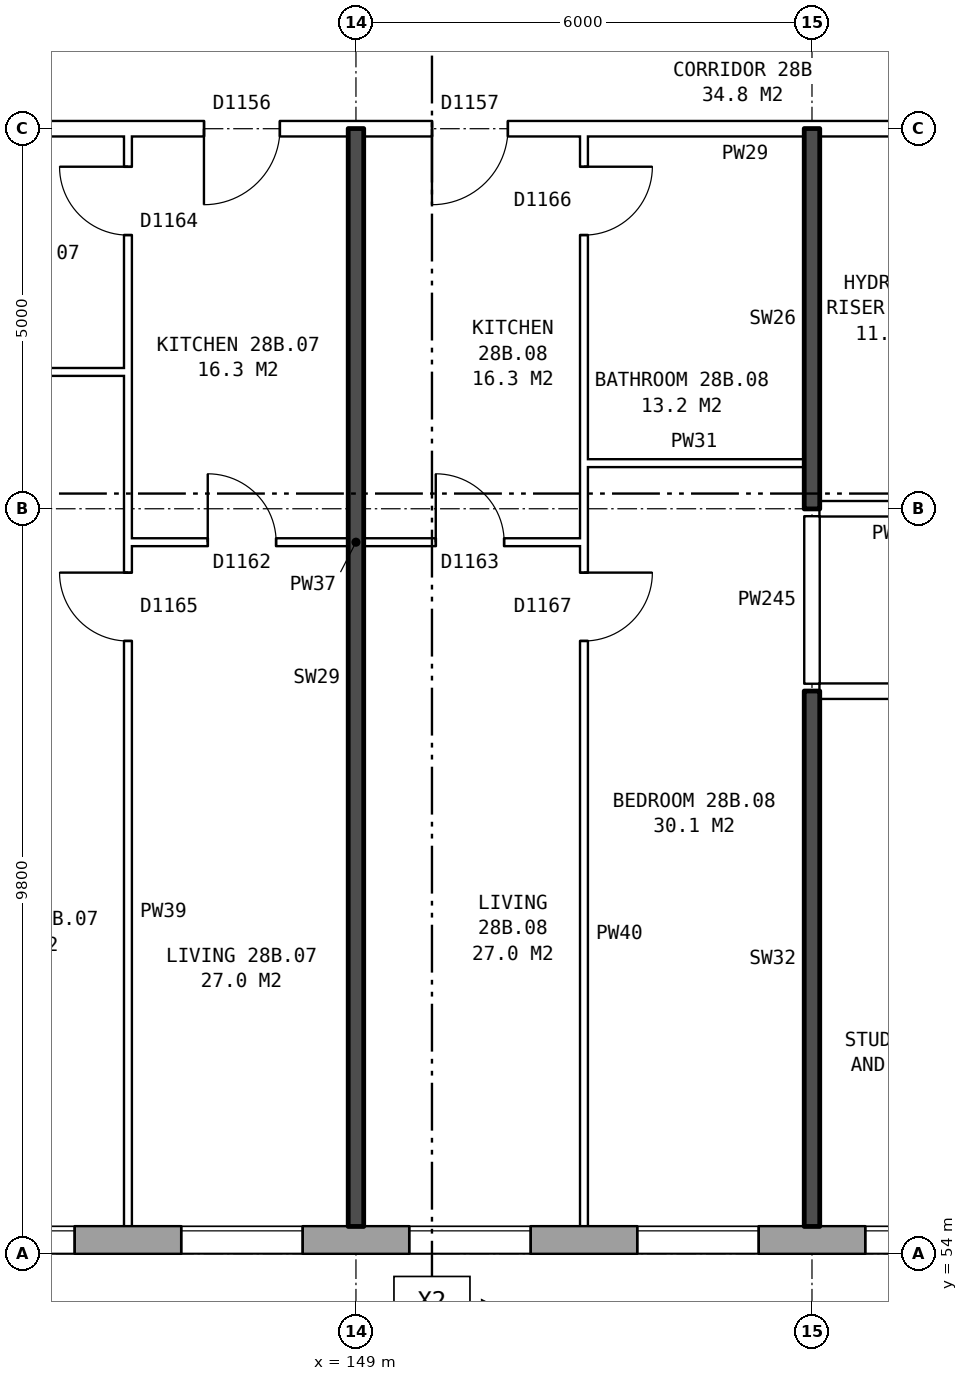
"""IFC4 building model, lengths in metres.
Left out: names, types, materials, properties, quantities, classifications, styles, units other than length and angle.
Written with IfcOpenShell. Run it as: python <this file> out.ifc"""

import sys

from ifc_helpers import new_model, si_unit, direction, frame, frame_2d, origin, place, context, subcontext, project, spatial, rectangle, extrude, element, fill, save


model = new_model("IFC4")
c1 = context("Model", 3, precision=1e-05, world=origin(), true_north=direction((0.0, 1.0)))
c2 = subcontext(c1, "Body", "Model", "MODEL_VIEW")
j1 = project(units=[si_unit("LENGTHUNIT", "METRE"), si_unit("PLANEANGLEUNIT", "RADIAN")], contexts=[c1])
p1 = place(None, origin())
s1 = spatial("IfcSite", under=j1, at=p1, CompositionType="ELEMENT")
p2 = place(p1, origin())
s2 = spatial("IfcBuilding", under=s1, at=p2, CompositionType="ELEMENT")
p3 = place(p2, frame((0.0, 0.0, 102.6)))
s3 = spatial("IfcBuildingStorey", under=s2, at=p3, CompositionType="ELEMENT", Elevation=102.6)
p4 = place(p3, frame((134.075, 54.18, 0.0), z_axis=(0.0, 0.0, 1.0), x_axis=(1.0, 0.0, 0.0)))
e1 = element("IfcWall", 1, at=p4, inside=s3, PredefinedType="STANDARD", context=c2, shape_type="SweptSolid", body=[
    extrude(rectangle(XDim=36.851, YDim=0.36, at=frame_2d((18.425, 0.0))), origin(), (0.0, 0.0, 1.0), 2.85),
])
p5 = place(p4, frame((0.625, 0.0, 0.8)))
e2 = element("IfcOpeningElement", 2, at=p5, cuts=e1, PredefinedType="OPENING", context=c2, shape_type="SweptSolid", body=[
    extrude(rectangle(XDim=1.6, YDim=1.8, at=frame_2d((0.8, 0.9))), frame((0.0, 0.19, 0.0), z_axis=(0.0, -1.0, 0.0), x_axis=(1.0, 0.0, 0.0)), (0.0, 0.0, 1.0), 0.38),
])
p6 = place(p4, frame((3.625, 0.0, 0.8)))
e3 = element("IfcOpeningElement", 3, at=p6, cuts=e1, PredefinedType="OPENING", context=c2, shape_type="SweptSolid", body=[
    extrude(rectangle(XDim=1.6, YDim=1.8, at=frame_2d((0.8, 0.9))), frame((0.0, 0.19, 0.0), z_axis=(0.0, -1.0, 0.0), x_axis=(1.0, 0.0, 0.0)), (0.0, 0.0, 1.0), 0.38),
])
p7 = place(p4, frame((7.475, 0.0, 0.8)))
e4 = element("IfcOpeningElement", 4, at=p7, cuts=e1, PredefinedType="OPENING", context=c2, shape_type="SweptSolid", body=[
    extrude(rectangle(XDim=1.2, YDim=1.2, at=frame_2d((0.6, 0.6))), frame((0.0, 0.19, 0.0), z_axis=(0.0, -1.0, 0.0), x_axis=(1.0, 0.0, 0.0)), (0.0, 0.0, 1.0), 0.38),
])
p8 = place(p4, frame((9.625, 0.0, 0.8)))
e5 = element("IfcOpeningElement", 5, at=p8, cuts=e1, PredefinedType="OPENING", context=c2, shape_type="SweptSolid", body=[
    extrude(rectangle(XDim=1.6, YDim=1.8, at=frame_2d((0.8, 0.9))), frame((0.0, 0.19, 0.0), z_axis=(0.0, -1.0, 0.0), x_axis=(1.0, 0.0, 0.0)), (0.0, 0.0, 1.0), 0.38),
])
p9 = place(p4, frame((12.625, 0.0, 0.8)))
e6 = element("IfcOpeningElement", 6, at=p9, cuts=e1, PredefinedType="OPENING", context=c2, shape_type="SweptSolid", body=[
    extrude(rectangle(XDim=1.6, YDim=1.8, at=frame_2d((0.8, 0.9))), frame((0.0, 0.19, 0.0), z_axis=(0.0, -1.0, 0.0), x_axis=(1.0, 0.0, 0.0)), (0.0, 0.0, 1.0), 0.38),
])
p10 = place(p4, frame((15.625, 0.0, 0.8)))
e7 = element("IfcOpeningElement", 7, at=p10, cuts=e1, PredefinedType="OPENING", context=c2, shape_type="SweptSolid", body=[
    extrude(rectangle(XDim=1.6, YDim=1.8, at=frame_2d((0.8, 0.9))), frame((0.0, 0.19, 0.0), z_axis=(0.0, -1.0, 0.0), x_axis=(1.0, 0.0, 0.0)), (0.0, 0.0, 1.0), 0.38),
])
p11 = place(p4, frame((18.625, 0.0, 0.8)))
e8 = element("IfcOpeningElement", 8, at=p11, cuts=e1, PredefinedType="OPENING", context=c2, shape_type="SweptSolid", body=[
    extrude(rectangle(XDim=1.6, YDim=1.8, at=frame_2d((0.8, 0.9))), frame((0.0, 0.19, 0.0), z_axis=(0.0, -1.0, 0.0), x_axis=(1.0, 0.0, 0.0)), (0.0, 0.0, 1.0), 0.38),
])
p12 = place(p4, frame((21.625, 0.0, 0.8)))
e9 = element("IfcOpeningElement", 9, at=p12, cuts=e1, PredefinedType="OPENING", context=c2, shape_type="SweptSolid", body=[
    extrude(rectangle(XDim=1.6, YDim=1.8, at=frame_2d((0.8, 0.9))), frame((0.0, 0.19, 0.0), z_axis=(0.0, -1.0, 0.0), x_axis=(1.0, 0.0, 0.0)), (0.0, 0.0, 1.0), 0.38),
])
p13 = place(p4, frame((24.625, 0.0, 0.8)))
e10 = element("IfcOpeningElement", 10, at=p13, cuts=e1, PredefinedType="OPENING", context=c2, shape_type="SweptSolid", body=[
    extrude(rectangle(XDim=1.6, YDim=1.8, at=frame_2d((0.8, 0.9))), frame((0.0, 0.19, 0.0), z_axis=(0.0, -1.0, 0.0), x_axis=(1.0, 0.0, 0.0)), (0.0, 0.0, 1.0), 0.38),
])
p14 = place(p4, frame((27.125, 0.0, 0.8)))
e11 = element("IfcOpeningElement", 11, at=p14, cuts=e1, PredefinedType="OPENING", context=c2, shape_type="SweptSolid", body=[
    extrude(rectangle(XDim=1.4, YDim=1.8, at=frame_2d((0.7, 0.9))), frame((0.0, 0.19, 0.0), z_axis=(0.0, -1.0, 0.0), x_axis=(1.0, 0.0, 0.0)), (0.0, 0.0, 1.0), 0.38),
])
p15 = place(p4, frame((28.825, 0.0, 0.8)))
e12 = element("IfcOpeningElement", 12, at=p15, cuts=e1, PredefinedType="OPENING", context=c2, shape_type="SweptSolid", body=[
    extrude(rectangle(XDim=0.8, YDim=0.9, at=frame_2d((0.4, 0.45))), frame((0.0, 0.19, 0.0), z_axis=(0.0, -1.0, 0.0), x_axis=(1.0, 0.0, 0.0)), (0.0, 0.0, 1.0), 0.38),
])
p16 = place(p4, frame((33.625, 0.0, 0.8)))
e13 = element("IfcOpeningElement", 13, at=p16, cuts=e1, PredefinedType="OPENING", context=c2, shape_type="SweptSolid", body=[
    extrude(rectangle(XDim=1.6, YDim=1.8, at=frame_2d((0.8, 0.9))), frame((0.0, 0.19, 0.0), z_axis=(0.0, -1.0, 0.0), x_axis=(1.0, 0.0, 0.0)), (0.0, 0.0, 1.0), 0.38),
])
p17 = place(p4, frame((30.825, 0.0, 1.7)))
e14 = element("IfcOpeningElement", 14, at=p17, cuts=e1, PredefinedType="OPENING", context=c2, shape_type="SweptSolid", body=[
    extrude(rectangle(XDim=0.8, YDim=0.9, at=frame_2d((0.4, 0.45))), frame((0.0, 0.19, 0.0), z_axis=(0.0, -1.0, 0.0), x_axis=(1.0, 0.0, 0.0)), (0.0, 0.0, 1.0), 0.38),
])
p18 = place(p4, frame((31.925, 0.0, 0.8)))
e15 = element("IfcOpeningElement", 15, at=p18, cuts=e1, PredefinedType="OPENING", context=c2, shape_type="SweptSolid", body=[
    extrude(rectangle(XDim=0.8, YDim=1.8, at=frame_2d((0.4, 0.9))), frame((0.0, 0.19, 0.0), z_axis=(0.0, -1.0, 0.0), x_axis=(1.0, 0.0, 0.0)), (0.0, 0.0, 1.0), 0.38),
])
p19 = place(p3, frame((155.1, 61.4, 0.0), z_axis=(0.0, 0.0, 1.0), x_axis=(1.0, 0.0, 0.0)))
e16 = element("IfcWall", 16, at=p19, inside=s3, PredefinedType="PARTITIONING", context=c2, shape_type="SweptSolid", body=[
    extrude(rectangle(XDim=18.54, YDim=0.2, at=frame_2d((9.27, 0.0))), origin(), (0.0, 0.0, 1.0), 2.85),
])
p20 = place(p19, frame((1.45, 0.0, 0.0)))
e17 = element("IfcOpeningElement", 17, at=p20, cuts=e16, PredefinedType="OPENING", context=c2, shape_type="SweptSolid", body=[
    extrude(rectangle(XDim=1.0, YDim=2.1, at=frame_2d((0.5, 1.05))), frame((0.0, 0.11, 0.0), z_axis=(0.0, -1.0, 0.0), x_axis=(1.0, 0.0, 0.0)), (0.0, 0.0, 1.0), 0.22),
])
p21 = place(p19, frame((9.6, 0.0, 0.0)))
e18 = element("IfcOpeningElement", 18, at=p21, cuts=e16, PredefinedType="OPENING", context=c2, shape_type="SweptSolid", body=[
    extrude(rectangle(XDim=1.0, YDim=2.1, at=frame_2d((0.5, 1.05))), frame((0.0, 0.11, 0.0), z_axis=(0.0, -1.0, 0.0), x_axis=(1.0, 0.0, 0.0)), (0.0, 0.0, 1.0), 0.22),
])
p22 = place(p19, frame((15.92, 0.0, 0.0)))
e19 = element("IfcOpeningElement", 19, at=p22, cuts=e16, PredefinedType="OPENING", context=c2, shape_type="SweptSolid", body=[
    extrude(rectangle(XDim=1.0, YDim=2.1, at=frame_2d((0.5, 1.05))), frame((0.0, 0.11, 0.0), z_axis=(0.0, -1.0, 0.0), x_axis=(1.0, 0.0, 0.0)), (0.0, 0.0, 1.0), 0.22),
])
p23 = place(p3, frame((146.0, 63.36, 0.0), z_axis=(0.0, 0.0, 1.0), x_axis=(1.0, 0.0, 0.0)))
e20 = element("IfcWall", 20, at=p23, inside=s3, PredefinedType="PARTITIONING", context=c2, shape_type="SweptSolid", body=[
    extrude(rectangle(XDim=6.0, YDim=0.1, at=frame_2d((3.0, 0.0))), origin(), (0.0, 0.0, 1.0), 2.85),
])
p24 = place(p23, frame((1.05, 0.0, 0.0)))
e21 = element("IfcOpeningElement", 21, at=p24, cuts=e20, PredefinedType="OPENING", context=c2, shape_type="SweptSolid", body=[
    extrude(rectangle(XDim=0.9, YDim=2.1, at=frame_2d((0.45, 1.05))), frame((0.0, 0.06, 0.0), z_axis=(0.0, -1.0, 0.0), x_axis=(1.0, 0.0, 0.0)), (0.0, 0.0, 1.0), 0.12),
])
p25 = place(p23, frame((4.05, 0.0, 0.0)))
e22 = element("IfcOpeningElement", 22, at=p25, cuts=e20, PredefinedType="OPENING", context=c2, shape_type="SweptSolid", body=[
    extrude(rectangle(XDim=0.9, YDim=2.1, at=frame_2d((0.45, 1.05))), frame((0.0, 0.06, 0.0), z_axis=(0.0, -1.0, 0.0), x_axis=(1.0, 0.0, 0.0)), (0.0, 0.0, 1.0), 0.12),
])
p26 = place(p3, frame((155.1, 63.8, 0.0), z_axis=(0.0, 0.0, 1.0), x_axis=(1.0, 0.0, 0.0)))
e23 = element("IfcWall", 23, at=p26, inside=s3, PredefinedType="PARTITIONING", context=c2, shape_type="SweptSolid", body=[
    extrude(rectangle(XDim=2.14, YDim=0.2, at=frame_2d((1.07, 0.0))), origin(), (0.0, 0.0, 1.0), 2.85),
])
p27 = place(p3, frame((152.0, 64.4, 0.0), z_axis=(0.0, 0.0, 1.0), x_axis=(1.0, 0.0, 0.0)))
e24 = element("IfcWall", 24, at=p27, inside=s3, PredefinedType="PARTITIONING", context=c2, shape_type="SweptSolid", body=[
    extrude(rectangle(XDim=2.9, YDim=0.1, at=frame_2d((1.45, 0.0))), origin(), (0.0, 0.0, 1.0), 2.85),
])
p28 = place(p3, frame((142.76, 65.6, 0.0), z_axis=(0.0, 0.0, 1.0), x_axis=(1.0, 0.0, 0.0)))
e25 = element("IfcWall", 25, at=p28, inside=s3, PredefinedType="PARTITIONING", context=c2, shape_type="SweptSolid", body=[
    extrude(rectangle(XDim=3.24, YDim=0.1, at=frame_2d((1.62, 0.0))), origin(), (0.0, 0.0, 1.0), 2.85),
])
p29 = place(p3, frame((142.76, 68.8, 0.0), z_axis=(0.0, 0.0, 1.0), x_axis=(1.0, 0.0, 0.0)))
e26 = element("IfcWall", 26, at=p29, inside=s3, PredefinedType="PARTITIONING", context=c2, shape_type="SweptSolid", body=[
    extrude(rectangle(XDim=14.48, YDim=0.2, at=frame_2d((7.24, 0.0))), origin(), (0.0, 0.0, 1.0), 2.85),
])
p30 = place(p29, frame((4.24, 0.0, 0.0)))
e27 = element("IfcOpeningElement", 27, at=p30, cuts=e26, PredefinedType="OPENING", context=c2, shape_type="SweptSolid", body=[
    extrude(rectangle(XDim=1.0, YDim=2.1, at=frame_2d((0.5, 1.05))), frame((0.0, 0.11, 0.0), z_axis=(0.0, -1.0, 0.0), x_axis=(1.0, 0.0, 0.0)), (0.0, 0.0, 1.0), 0.22),
])
p31 = place(p29, frame((7.24, 0.0, 0.0)))
e28 = element("IfcOpeningElement", 28, at=p31, cuts=e26, PredefinedType="OPENING", context=c2, shape_type="SweptSolid", body=[
    extrude(rectangle(XDim=1.0, YDim=2.1, at=frame_2d((0.5, 1.05))), frame((0.0, 0.11, 0.0), z_axis=(0.0, -1.0, 0.0), x_axis=(1.0, 0.0, 0.0)), (0.0, 0.0, 1.0), 0.22),
])
p32 = place(p3, frame((146.0, 54.36, 0.0), z_axis=(0.0, 0.0, 1.0), x_axis=(0.0, 1.0, 0.0)))
e29 = element("IfcWall", 29, at=p32, inside=s3, PredefinedType="PARTITIONING", context=c2, shape_type="SweptSolid", body=[
    extrude(rectangle(XDim=14.34, YDim=0.1, at=frame_2d((7.17, 0.0))), origin(), (0.0, 0.0, 1.0), 2.85),
])
p33 = place(p32, frame((7.7, 0.0, 0.0)))
e30 = element("IfcOpeningElement", 30, at=p33, cuts=e29, PredefinedType="OPENING", context=c2, shape_type="SweptSolid", body=[
    extrude(rectangle(XDim=0.9, YDim=2.1, at=frame_2d((0.45, 1.05))), frame((0.0, 0.06, 0.0), z_axis=(0.0, -1.0, 0.0), x_axis=(1.0, 0.0, 0.0)), (0.0, 0.0, 1.0), 0.12),
])
p34 = place(p32, frame((13.04, 0.0, 0.0)))
e31 = element("IfcOpeningElement", 31, at=p34, cuts=e29, PredefinedType="OPENING", context=c2, shape_type="SweptSolid", body=[
    extrude(rectangle(XDim=0.9, YDim=2.1, at=frame_2d((0.45, 1.05))), frame((0.0, 0.06, 0.0), z_axis=(0.0, -1.0, 0.0), x_axis=(1.0, 0.0, 0.0)), (0.0, 0.0, 1.0), 0.12),
])
p35 = place(p3, frame((149.0, 54.36, 0.0), z_axis=(0.0, 0.0, 1.0), x_axis=(0.0, 1.0, 0.0)))
e32 = element("IfcWall", 32, at=p35, inside=s3, PredefinedType="SOLIDWALL", context=c2, shape_type="SweptSolid", body=[
    extrude(rectangle(XDim=14.44, YDim=0.2, at=frame_2d((7.22, 0.0))), origin(), (0.0, 0.0, 1.0), 2.85),
])
p36 = place(p3, frame((152.0, 54.36, 0.0), z_axis=(0.0, 0.0, 1.0), x_axis=(0.0, 1.0, 0.0)))
e33 = element("IfcWall", 33, at=p36, inside=s3, PredefinedType="PARTITIONING", context=c2, shape_type="SweptSolid", body=[
    extrude(rectangle(XDim=14.34, YDim=0.1, at=frame_2d((7.17, 0.0))), origin(), (0.0, 0.0, 1.0), 2.85),
])
p37 = place(p36, frame((7.7, 0.0, 0.0)))
e34 = element("IfcOpeningElement", 34, at=p37, cuts=e33, PredefinedType="OPENING", context=c2, shape_type="SweptSolid", body=[
    extrude(rectangle(XDim=0.9, YDim=2.1, at=frame_2d((0.45, 1.05))), frame((0.0, 0.06, 0.0), z_axis=(0.0, -1.0, 0.0), x_axis=(1.0, 0.0, 0.0)), (0.0, 0.0, 1.0), 0.12),
])
p38 = place(p36, frame((13.04, 0.0, 0.0)))
e35 = element("IfcOpeningElement", 35, at=p38, cuts=e33, PredefinedType="OPENING", context=c2, shape_type="SweptSolid", body=[
    extrude(rectangle(XDim=0.9, YDim=2.1, at=frame_2d((0.45, 1.05))), frame((0.0, 0.06, 0.0), z_axis=(0.0, -1.0, 0.0), x_axis=(1.0, 0.0, 0.0)), (0.0, 0.0, 1.0), 0.12),
])
p39 = place(p3, frame((155.0, 54.36, 0.0), z_axis=(0.0, 0.0, 1.0), x_axis=(0.0, 1.0, 0.0)))
e36 = element("IfcWall", 36, at=p39, inside=s3, PredefinedType="SOLIDWALL", context=c2, shape_type="SweptSolid", body=[
    extrude(rectangle(XDim=7.04, YDim=0.2, at=frame_2d((3.52, 0.0))), origin(), (0.0, 0.0, 1.0), 2.85),
])
p40 = place(p3, frame((155.0, 61.5, 0.0), z_axis=(0.0, 0.0, 1.0), x_axis=(0.0, 1.0, 0.0)))
e37 = element("IfcWall", 37, at=p40, inside=s3, PredefinedType="PARTITIONING", context=c2, shape_type="SweptSolid", body=[
    extrude(rectangle(XDim=2.2, YDim=0.2, at=frame_2d((1.1, 0.0))), origin(), (0.0, 0.0, 1.0), 2.85),
])
p41 = place(p3, frame((155.0, 63.8, 0.0), z_axis=(0.0, 0.0, 1.0), x_axis=(0.0, 1.0, 0.0)))
e38 = element("IfcWall", 38, at=p41, inside=s3, PredefinedType="SOLIDWALL", context=c2, shape_type="SweptSolid", body=[
    extrude(rectangle(XDim=5.0, YDim=0.2, at=frame_2d((2.5, 0.0))), origin(), (0.0, 0.0, 1.0), 2.85),
])
p42 = place(p8, origin())
e39 = element("IfcWindow", 39, at=p42, inside=s3, PartitioningType="SINGLE_PANEL", PredefinedType="WINDOW", context=c2, shape_type="SweptSolid", body=[
    extrude(rectangle(XDim=1.6, YDim=1.8, at=frame_2d((0.8, 0.9))), frame((0.0, 0.15, 0.0), z_axis=(0.0, -1.0, 0.0), x_axis=(1.0, 0.0, 0.0)), (0.0, 0.0, 1.0), 0.06),
])
fill(e5, e39)
p43 = place(p9, origin())
e40 = element("IfcWindow", 40, at=p43, inside=s3, PartitioningType="SINGLE_PANEL", PredefinedType="WINDOW", context=c2, shape_type="SweptSolid", body=[
    extrude(rectangle(XDim=1.6, YDim=1.8, at=frame_2d((0.8, 0.9))), frame((0.0, 0.15, 0.0), z_axis=(0.0, -1.0, 0.0), x_axis=(1.0, 0.0, 0.0)), (0.0, 0.0, 1.0), 0.06),
])
fill(e6, e40)
p44 = place(p10, origin())
e41 = element("IfcWindow", 41, at=p44, inside=s3, PartitioningType="SINGLE_PANEL", PredefinedType="WINDOW", context=c2, shape_type="SweptSolid", body=[
    extrude(rectangle(XDim=1.6, YDim=1.8, at=frame_2d((0.8, 0.9))), frame((0.0, 0.15, 0.0), z_axis=(0.0, -1.0, 0.0), x_axis=(1.0, 0.0, 0.0)), (0.0, 0.0, 1.0), 0.06),
])
fill(e7, e41)
p45 = place(p11, origin())
e42 = element("IfcWindow", 42, at=p45, inside=s3, PartitioningType="SINGLE_PANEL", PredefinedType="WINDOW", context=c2, shape_type="SweptSolid", body=[
    extrude(rectangle(XDim=1.6, YDim=1.8, at=frame_2d((0.8, 0.9))), frame((0.0, 0.15, 0.0), z_axis=(0.0, -1.0, 0.0), x_axis=(1.0, 0.0, 0.0)), (0.0, 0.0, 1.0), 0.06),
])
fill(e8, e42)
p46 = place(p12, origin())
e43 = element("IfcWindow", 43, at=p46, inside=s3, PartitioningType="SINGLE_PANEL", PredefinedType="WINDOW", context=c2, shape_type="SweptSolid", body=[
    extrude(rectangle(XDim=1.6, YDim=1.8, at=frame_2d((0.8, 0.9))), frame((0.0, 0.15, 0.0), z_axis=(0.0, -1.0, 0.0), x_axis=(1.0, 0.0, 0.0)), (0.0, 0.0, 1.0), 0.06),
])
fill(e9, e43)
p47 = place(p33, origin())
e44 = element("IfcDoor", 44, at=p47, inside=s3, OperationType="SINGLE_SWING_RIGHT", PredefinedType="DOOR", context=c2, shape_type="SweptSolid", body=[
    extrude(rectangle(XDim=0.9, YDim=2.1, at=frame_2d((0.45, 1.05))), frame((0.0, 0.025, 0.0), z_axis=(0.0, -1.0, 0.0), x_axis=(1.0, 0.0, 0.0)), (0.0, 0.0, 1.0), 0.05),
])
fill(e30, e44)
p48 = place(p30, frame((1.0, 0.0, 0.0), z_axis=(0.0, 0.0, 1.0), x_axis=(-1.0, 0.0, 0.0)))
e45 = element("IfcDoor", 45, at=p48, inside=s3, OperationType="SINGLE_SWING_RIGHT", PredefinedType="DOOR", context=c2, shape_type="SweptSolid", body=[
    extrude(rectangle(XDim=1.0, YDim=2.1, at=frame_2d((0.5, 1.05))), frame((0.0, 0.025, 0.0), z_axis=(0.0, -1.0, 0.0), x_axis=(1.0, 0.0, 0.0)), (0.0, 0.0, 1.0), 0.05),
])
fill(e27, e45)
p49 = place(p24, origin())
e46 = element("IfcDoor", 46, at=p49, inside=s3, OperationType="SINGLE_SWING_LEFT", PredefinedType="DOOR", context=c2, shape_type="SweptSolid", body=[
    extrude(rectangle(XDim=0.9, YDim=2.1, at=frame_2d((0.45, 1.05))), frame((0.0, 0.025, 0.0), z_axis=(0.0, -1.0, 0.0), x_axis=(1.0, 0.0, 0.0)), (0.0, 0.0, 1.0), 0.05),
])
fill(e21, e46)
p50 = place(p34, origin())
e47 = element("IfcDoor", 47, at=p50, inside=s3, OperationType="SINGLE_SWING_RIGHT", PredefinedType="DOOR", context=c2, shape_type="SweptSolid", body=[
    extrude(rectangle(XDim=0.9, YDim=2.1, at=frame_2d((0.45, 1.05))), frame((0.0, 0.025, 0.0), z_axis=(0.0, -1.0, 0.0), x_axis=(1.0, 0.0, 0.0)), (0.0, 0.0, 1.0), 0.05),
])
fill(e31, e47)
p51 = place(p37, frame((0.9, 0.0, 0.0), z_axis=(0.0, 0.0, 1.0), x_axis=(-1.0, 0.0, 0.0)))
e48 = element("IfcDoor", 48, at=p51, inside=s3, OperationType="SINGLE_SWING_LEFT", PredefinedType="DOOR", context=c2, shape_type="SweptSolid", body=[
    extrude(rectangle(XDim=0.9, YDim=2.1, at=frame_2d((0.45, 1.05))), frame((0.0, 0.025, 0.0), z_axis=(0.0, -1.0, 0.0), x_axis=(1.0, 0.0, 0.0)), (0.0, 0.0, 1.0), 0.05),
])
fill(e34, e48)
p52 = place(p31, frame((1.0, 0.0, 0.0), z_axis=(0.0, 0.0, 1.0), x_axis=(-1.0, 0.0, 0.0)))
e49 = element("IfcDoor", 49, at=p52, inside=s3, OperationType="SINGLE_SWING_RIGHT", PredefinedType="DOOR", context=c2, shape_type="SweptSolid", body=[
    extrude(rectangle(XDim=1.0, YDim=2.1, at=frame_2d((0.5, 1.05))), frame((0.0, 0.025, 0.0), z_axis=(0.0, -1.0, 0.0), x_axis=(1.0, 0.0, 0.0)), (0.0, 0.0, 1.0), 0.05),
])
fill(e28, e49)
p53 = place(p25, origin())
e50 = element("IfcDoor", 50, at=p53, inside=s3, OperationType="SINGLE_SWING_LEFT", PredefinedType="DOOR", context=c2, shape_type="SweptSolid", body=[
    extrude(rectangle(XDim=0.9, YDim=2.1, at=frame_2d((0.45, 1.05))), frame((0.0, 0.025, 0.0), z_axis=(0.0, -1.0, 0.0), x_axis=(1.0, 0.0, 0.0)), (0.0, 0.0, 1.0), 0.05),
])
fill(e22, e50)
p54 = place(p38, frame((0.9, 0.0, 0.0), z_axis=(0.0, 0.0, 1.0), x_axis=(-1.0, 0.0, 0.0)))
e51 = element("IfcDoor", 51, at=p54, inside=s3, OperationType="SINGLE_SWING_LEFT", PredefinedType="DOOR", context=c2, shape_type="SweptSolid", body=[
    extrude(rectangle(XDim=0.9, YDim=2.1, at=frame_2d((0.45, 1.05))), frame((0.0, 0.025, 0.0), z_axis=(0.0, -1.0, 0.0), x_axis=(1.0, 0.0, 0.0)), (0.0, 0.0, 1.0), 0.05),
])
fill(e35, e51)
save(model, sys.argv[1])
